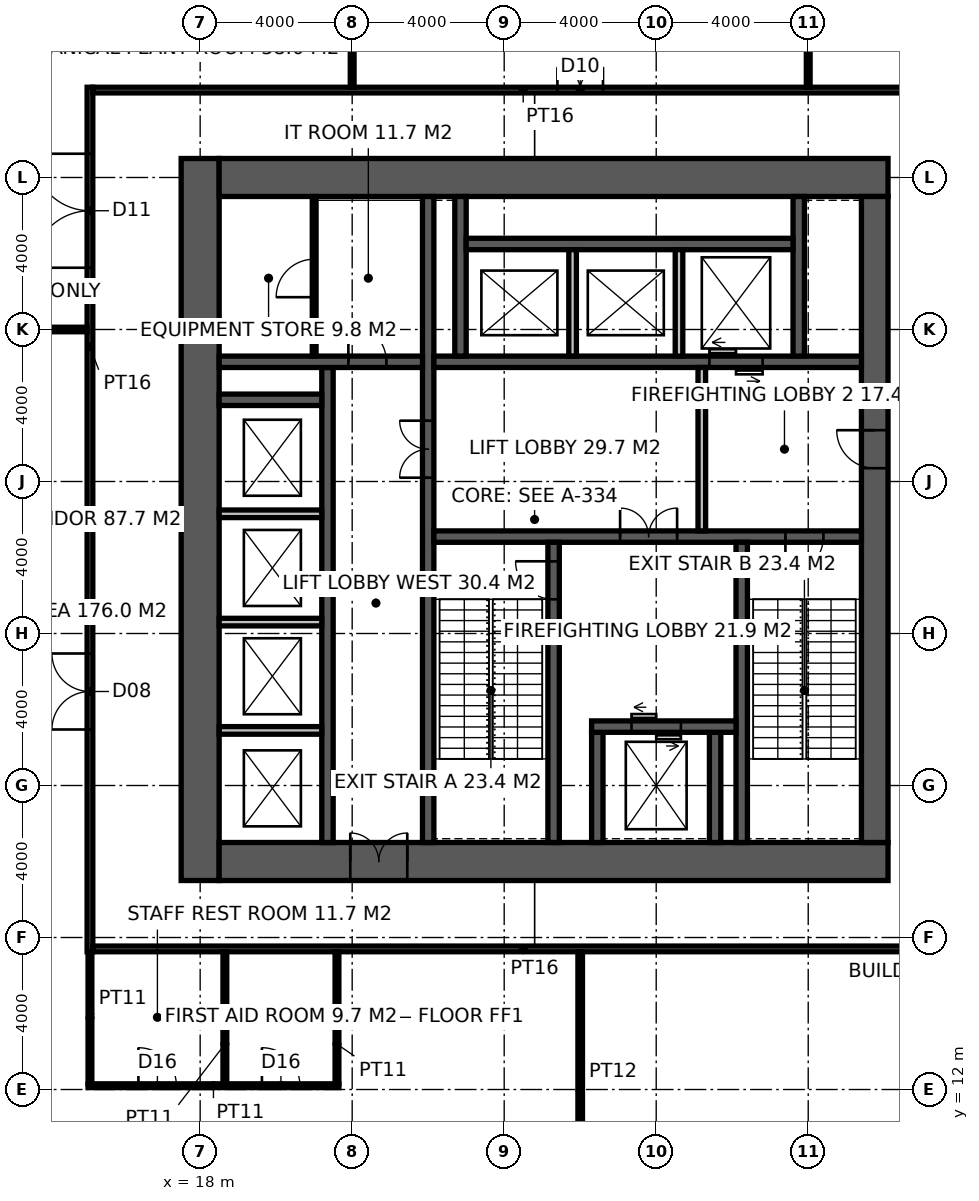
"""IFC4 building model, lengths in metres.
Left out: names, types, materials, properties, quantities, classifications, styles, units other than length and angle.
Written with IfcOpenShell. Run it as: python <this file> out.ifc"""

import sys

from ifc_helpers import new_model, si_unit, direction, frame, frame_2d, origin, place, context, subcontext, project, spatial, rectangle, extrude, element, fill, save


model = new_model("IFC4")
c1 = context("Model", 3, precision=1e-05, world=origin(), true_north=direction((0.0, 1.0)))
c2 = subcontext(c1, "Body", "Model", "MODEL_VIEW")
j1 = project(units=[si_unit("LENGTHUNIT", "METRE"), si_unit("PLANEANGLEUNIT", "RADIAN")], contexts=[c1])
p1 = place(None, origin())
s1 = spatial("IfcSite", under=j1, at=p1, CompositionType="ELEMENT")
p2 = place(p1, origin())
s2 = spatial("IfcBuilding", under=s1, at=p2, CompositionType="ELEMENT")
p3 = place(p2, frame((0.0, 0.0, 203.8)))
s3 = spatial("IfcBuildingStorey", under=s2, at=p3, CompositionType="ELEMENT", Elevation=203.8)
p4 = place(p3, frame((18.0, 17.5, -0.15), z_axis=(0.0, 0.0, 1.0), x_axis=(0.0, 1.0, 0.0)))
e1 = element("IfcWall", 1, at=p4, inside=s3, PredefinedType="SHEAR", context=c2, shape_type="SweptSolid", body=[
    extrude(rectangle(XDim=19.0, YDim=1.0, at=frame_2d((9.5, 0.0))), origin(), (0.0, 0.0, 1.0), 5.4),
])
p5 = place(p3, frame((18.5, 18.0, -0.15), z_axis=(0.0, 0.0, 1.0), x_axis=(1.0, 0.0, 0.0)))
e2 = element("IfcWall", 2, at=p5, inside=s3, PredefinedType="SHEAR", context=c2, shape_type="SweptSolid", body=[
    extrude(rectangle(XDim=17.6, YDim=1.0, at=frame_2d((8.8, 0.0))), origin(), (0.0, 0.0, 1.0), 5.4),
])
p6 = place(p5, frame((3.45, 0.0, 0.15)))
e3 = element("IfcOpeningElement", 3, at=p6, cuts=e2, PredefinedType="OPENING", context=c2, shape_type="SweptSolid", body=[
    extrude(rectangle(XDim=1.5, YDim=2.4, at=frame_2d((0.75, 1.2))), frame((0.0, 0.51, 0.0), z_axis=(0.0, -1.0, 0.0), x_axis=(1.0, 0.0, 0.0)), (0.0, 0.0, 1.0), 1.02),
])
p7 = place(p3, frame((18.5, 36.0, -0.15), z_axis=(0.0, 0.0, 1.0), x_axis=(1.0, 0.0, 0.0)))
e4 = element("IfcWall", 4, at=p7, inside=s3, PredefinedType="SHEAR", context=c2, shape_type="SweptSolid", body=[
    extrude(rectangle(XDim=17.6, YDim=1.0, at=frame_2d((8.8, 0.0))), origin(), (0.0, 0.0, 1.0), 5.4),
])
p8 = place(p3, frame((35.75, 18.5, -0.15), z_axis=(0.0, 0.0, 1.0), x_axis=(0.0, 1.0, 0.0)))
e5 = element("IfcWall", 5, at=p8, inside=s3, PredefinedType="SHEAR", context=c2, shape_type="SweptSolid", body=[
    extrude(rectangle(XDim=17.0, YDim=0.7, at=frame_2d((8.5, 0.0))), origin(), (0.0, 0.0, 1.0), 5.4),
])
p9 = place(p8, frame((9.85, 0.0, 0.15)))
e6 = element("IfcOpeningElement", 6, at=p9, cuts=e5, PredefinedType="OPENING", context=c2, shape_type="SweptSolid", body=[
    extrude(rectangle(XDim=1.0, YDim=2.2, at=frame_2d((0.5, 1.1))), frame((0.0, 0.36, 0.0), z_axis=(0.0, -1.0, 0.0), x_axis=(1.0, 0.0, 0.0)), (0.0, 0.0, 1.0), 0.72),
])
p10 = place(p3, frame((24.0, 18.5, -0.15), z_axis=(0.0, 0.0, 1.0), x_axis=(0.0, 1.0, 0.0)))
e7 = element("IfcWall", 7, at=p10, inside=s3, PredefinedType="SHEAR", context=c2, shape_type="SweptSolid", body=[
    extrude(rectangle(XDim=17.0, YDim=0.3, at=frame_2d((8.5, 0.0))), origin(), (0.0, 0.0, 1.0), 5.4),
])
p11 = place(p10, frame((9.6, 0.0, 0.15)))
e8 = element("IfcOpeningElement", 8, at=p11, cuts=e7, PredefinedType="OPENING", context=c2, shape_type="SweptSolid", body=[
    extrude(rectangle(XDim=1.5, YDim=2.4, at=frame_2d((0.75, 1.2))), frame((0.0, 0.16, 0.0), z_axis=(0.0, -1.0, 0.0), x_axis=(1.0, 0.0, 0.0)), (0.0, 0.0, 1.0), 0.32),
])
p12 = place(p3, frame((24.15, 26.55, -0.15), z_axis=(0.0, 0.0, 1.0), x_axis=(1.0, 0.0, 0.0)))
e9 = element("IfcWall", 9, at=p12, inside=s3, PredefinedType="SHEAR", context=c2, shape_type="SweptSolid", body=[
    extrude(rectangle(XDim=11.25, YDim=0.3, at=frame_2d((5.625, 0.0))), origin(), (0.0, 0.0, 1.0), 5.4),
])
p13 = place(p12, frame((9.25, 0.0, 0.15)))
e10 = element("IfcOpeningElement", 10, at=p13, cuts=e9, PredefinedType="OPENING", context=c2, shape_type="SweptSolid", body=[
    extrude(rectangle(XDim=1.0, YDim=2.2, at=frame_2d((0.5, 1.1))), frame((0.0, 0.16, 0.0), z_axis=(0.0, -1.0, 0.0), x_axis=(1.0, 0.0, 0.0)), (0.0, 0.0, 1.0), 0.32),
])
p14 = place(p12, frame((4.9, 0.0, 0.15)))
e11 = element("IfcOpeningElement", 11, at=p14, cuts=e9, PredefinedType="OPENING", context=c2, shape_type="SweptSolid", body=[
    extrude(rectangle(XDim=1.5, YDim=2.4, at=frame_2d((0.75, 1.2))), frame((0.0, 0.16, 0.0), z_axis=(0.0, -1.0, 0.0), x_axis=(1.0, 0.0, 0.0)), (0.0, 0.0, 1.0), 0.32),
])
p15 = place(p3, frame((27.3, 18.5, -0.15), z_axis=(0.0, 0.0, 1.0), x_axis=(0.0, 1.0, 0.0)))
e12 = element("IfcWall", 12, at=p15, inside=s3, PredefinedType="SHEAR", context=c2, shape_type="SweptSolid", body=[
    extrude(rectangle(XDim=7.9, YDim=0.3, at=frame_2d((3.95, 0.0))), origin(), (0.0, 0.0, 1.0), 5.4),
])
p16 = place(p15, frame((6.4, 0.0, 0.15)))
e13 = element("IfcOpeningElement", 13, at=p16, cuts=e12, PredefinedType="OPENING", context=c2, shape_type="SweptSolid", body=[
    extrude(rectangle(XDim=1.0, YDim=2.2, at=frame_2d((0.5, 1.1))), frame((0.0, 0.16, 0.0), z_axis=(0.0, -1.0, 0.0), x_axis=(1.0, 0.0, 0.0)), (0.0, 0.0, 1.0), 0.32),
])
p17 = place(p3, frame((32.25, 18.5, -0.15), z_axis=(0.0, 0.0, 1.0), x_axis=(0.0, 1.0, 0.0)))
e14 = element("IfcWall", 14, at=p17, inside=s3, PredefinedType="SHEAR", context=c2, shape_type="SweptSolid", body=[
    extrude(rectangle(XDim=7.9, YDim=0.3, at=frame_2d((3.95, 0.0))), origin(), (0.0, 0.0, 1.0), 5.4),
])
for number, where, z_axis, x_axis in (
    (15, (28.45, 18.5, -0.15), (0.0, 0.0, 1.0), (0.0, 1.0, 0.0)),
    (16, (31.55, 18.5, -0.15), (0.0, 0.0, 1.0), (0.0, 1.0, 0.0)),
):
    element("IfcWall", number, at=place(p3, frame(where, z_axis=z_axis, x_axis=x_axis)), inside=s3, PredefinedType="SHEAR", context=c2, shape_type="SweptSolid", body=[
        extrude(rectangle(XDim=2.9, YDim=0.3, at=frame_2d((1.45, 0.0))), origin(), (0.0, 0.0, 1.0), 5.4),
    ])
p18 = place(p3, frame((28.3, 21.55, -0.15), z_axis=(0.0, 0.0, 1.0), x_axis=(1.0, 0.0, 0.0)))
e17 = element("IfcWall", 17, at=p18, inside=s3, PredefinedType="SHEAR", context=c2, shape_type="SweptSolid", body=[
    extrude(rectangle(XDim=3.8, YDim=0.3, at=frame_2d((1.9, 0.0))), origin(), (0.0, 0.0, 1.0), 5.4),
])
p19 = place(p18, frame((1.05, 0.0, 0.15)))
e18 = element("IfcOpeningElement", 18, at=p19, cuts=e17, PredefinedType="OPENING", context=c2, shape_type="SweptSolid", body=[
    extrude(rectangle(XDim=1.3, YDim=2.4, at=frame_2d((0.65, 1.2))), frame((0.0, 0.16, 0.0), z_axis=(0.0, -1.0, 0.0), x_axis=(1.0, 0.0, 0.0)), (0.0, 0.0, 1.0), 0.32),
])
p20 = place(p3, frame((24.15, 31.15, -0.15), z_axis=(0.0, 0.0, 1.0), x_axis=(1.0, 0.0, 0.0)))
e19 = element("IfcWall", 19, at=p20, inside=s3, PredefinedType="SHEAR", context=c2, shape_type="SweptSolid", body=[
    extrude(rectangle(XDim=11.25, YDim=0.3, at=frame_2d((5.625, 0.0))), origin(), (0.0, 0.0, 1.0), 5.4),
])
p21 = place(p20, frame((7.25, 0.0, 0.15)))
e20 = element("IfcOpeningElement", 20, at=p21, cuts=e19, PredefinedType="OPENING", context=c2, shape_type="SweptSolid", body=[
    extrude(rectangle(XDim=1.4, YDim=2.4, at=frame_2d((0.7, 1.2))), frame((0.0, 0.16, 0.0), z_axis=(0.0, -1.0, 0.0), x_axis=(1.0, 0.0, 0.0)), (0.0, 0.0, 1.0), 0.32),
])
p22 = place(p3, frame((21.35, 18.5, -0.15), z_axis=(0.0, 0.0, 1.0), x_axis=(0.0, 1.0, 0.0)))
e21 = element("IfcWall", 21, at=p22, inside=s3, PredefinedType="SHEAR", context=c2, shape_type="SweptSolid", body=[
    extrude(rectangle(XDim=12.5, YDim=0.3, at=frame_2d((6.25, 0.0))), origin(), (0.0, 0.0, 1.0), 5.4),
])
p23 = place(p3, frame((18.5, 31.15, -0.15), z_axis=(0.0, 0.0, 1.0), x_axis=(1.0, 0.0, 0.0)))
e22 = element("IfcWall", 22, at=p23, inside=s3, PredefinedType="SHEAR", context=c2, shape_type="SweptSolid", body=[
    extrude(rectangle(XDim=5.35, YDim=0.3, at=frame_2d((2.675, 0.0))), origin(), (0.0, 0.0, 1.0), 5.4),
])
p24 = place(p23, frame((3.4, 0.0, 0.15)))
e23 = element("IfcOpeningElement", 23, at=p24, cuts=e22, PredefinedType="OPENING", context=c2, shape_type="SweptSolid", body=[
    extrude(rectangle(XDim=1.0, YDim=2.2, at=frame_2d((0.5, 1.1))), frame((0.0, 0.16, 0.0), z_axis=(0.0, -1.0, 0.0), x_axis=(1.0, 0.0, 0.0)), (0.0, 0.0, 1.0), 0.32),
])
p25 = place(p3, frame((18.5, 30.15, -0.15), z_axis=(0.0, 0.0, 1.0), x_axis=(1.0, 0.0, 0.0)))
e24 = element("IfcWall", 24, at=p25, inside=s3, PredefinedType="SHEAR", context=c2, shape_type="SweptSolid", body=[
    extrude(rectangle(XDim=2.7, YDim=0.3, at=frame_2d((1.35, 0.0))), origin(), (0.0, 0.0, 1.0), 5.4),
])
for number, where, z_axis, x_axis in (
    (25, (24.85, 31.3, -0.15), (0.0, 0.0, 1.0), (0.0, 1.0, 0.0)),
    (26, (33.75, 31.3, -0.15), (0.0, 0.0, 1.0), (0.0, 1.0, 0.0)),
):
    element("IfcWall", number, at=place(p3, frame(where, z_axis=z_axis, x_axis=x_axis)), inside=s3, PredefinedType="SHEAR", context=c2, shape_type="SweptSolid", body=[
        extrude(rectangle(XDim=4.2, YDim=0.3, at=frame_2d((2.1, 0.0))), origin(), (0.0, 0.0, 1.0), 5.4),
    ])
p26 = place(p3, frame((25.0, 34.25, -0.15), z_axis=(0.0, 0.0, 1.0), x_axis=(1.0, 0.0, 0.0)))
e27 = element("IfcWall", 27, at=p26, inside=s3, PredefinedType="SHEAR", context=c2, shape_type="SweptSolid", body=[
    extrude(rectangle(XDim=8.6, YDim=0.3, at=frame_2d((4.3, 0.0))), origin(), (0.0, 0.0, 1.0), 5.4),
])
for number, where, z_axis, x_axis in (
    (28, (27.8, 31.3, -0.15), (0.0, 0.0, 1.0), (0.0, 1.0, 0.0)),
    (29, (30.6, 31.3, -0.15), (0.0, 0.0, 1.0), (0.0, 1.0, 0.0)),
):
    element("IfcWall", number, at=place(p3, frame(where, z_axis=z_axis, x_axis=x_axis)), inside=s3, PredefinedType="SOLIDWALL", context=c2, shape_type="SweptSolid", body=[
        extrude(rectangle(XDim=2.8, YDim=0.2, at=frame_2d((1.4, 0.0))), origin(), (0.0, 0.0, 1.0), 5.4),
    ])
for number, where, z_axis, x_axis in (
    (30, (18.5, 21.45, 0.0), (0.0, 0.0, 1.0), (1.0, 0.0, 0.0)),
    (31, (18.5, 24.3, 0.0), (0.0, 0.0, 1.0), (1.0, 0.0, 0.0)),
    (32, (18.5, 27.15, 0.0), (0.0, 0.0, 1.0), (1.0, 0.0, 0.0)),
):
    element("IfcWall", number, at=place(p3, frame(where, z_axis=z_axis, x_axis=x_axis)), inside=s3, PredefinedType="SOLIDWALL", context=c2, shape_type="SweptSolid", body=[
        extrude(rectangle(XDim=2.7, YDim=0.2, at=frame_2d((1.35, 0.0))), origin(), (0.0, 0.0, 1.0), 5.25),
    ])
p27 = place(p3, frame((31.2, 26.7, 0.0), z_axis=(0.0, 0.0, 1.0), x_axis=(0.0, 1.0, 0.0)))
e33 = element("IfcWall", 33, at=p27, inside=s3, PredefinedType="SOLIDWALL", context=c2, shape_type="SweptSolid", body=[
    extrude(rectangle(XDim=4.3, YDim=0.2, at=frame_2d((2.15, 0.0))), origin(), (0.0, 0.0, 1.0), 5.25),
])
p28 = place(p3, frame((21.0, 31.3, 0.0), z_axis=(0.0, 0.0, 1.0), x_axis=(0.0, 1.0, 0.0)))
e34 = element("IfcWall", 34, at=p28, inside=s3, PredefinedType="PARTITIONING", context=c2, shape_type="SweptSolid", body=[
    extrude(rectangle(XDim=4.2, YDim=0.1, at=frame_2d((2.1, 0.0))), origin(), (0.0, 0.0, 1.0), 5.25),
])
p29 = place(p28, frame((1.55, 0.0, 0.0)))
e35 = element("IfcOpeningElement", 35, at=p29, cuts=e34, PredefinedType="OPENING", context=c2, shape_type="SweptSolid", body=[
    extrude(rectangle(XDim=1.0, YDim=2.2, at=frame_2d((0.5, 1.1))), frame((0.0, 0.06, 0.0), z_axis=(0.0, -1.0, 0.0), x_axis=(1.0, 0.0, 0.0)), (0.0, 0.0, 1.0), 0.12),
])
p30 = place(p3, frame((15.1, 15.625, 0.0), z_axis=(0.0, 0.0, 1.0), x_axis=(0.0, 1.0, 0.0)))
e36 = element("IfcWall", 36, at=p30, inside=s3, PredefinedType="PARTITIONING", context=c2, shape_type="SweptSolid", body=[
    extrude(rectangle(XDim=22.75, YDim=0.15, at=frame_2d((11.375, 0.0))), origin(), (0.0, 0.0, 1.0), 5.25),
])
p31 = place(p30, frame((5.849, 0.0, 0.0)))
e37 = element("IfcOpeningElement", 37, at=p31, cuts=e36, PredefinedType="OPENING", context=c2, shape_type="SweptSolid", body=[
    extrude(rectangle(XDim=2.0, YDim=2.4, at=frame_2d((1.0, 1.2))), frame((0.0, 0.085, 0.0), z_axis=(0.0, -1.0, 0.0), x_axis=(1.0, 0.0, 0.0)), (0.0, 0.0, 1.0), 0.17),
])
p32 = place(p30, frame((18.0, 0.0, 0.0)))
e38 = element("IfcOpeningElement", 38, at=p32, cuts=e36, PredefinedType="OPENING", context=c2, shape_type="SweptSolid", body=[
    extrude(rectangle(XDim=3.0, YDim=3.3, at=frame_2d((1.5, 1.65))), frame((0.0, 0.085, 0.0), z_axis=(0.0, -1.0, 0.0), x_axis=(1.0, 0.0, 0.0)), (0.0, 0.0, 1.0), 0.17),
])
p33 = place(p3, frame((15.175, 15.7, 0.0), z_axis=(0.0, 0.0, 1.0), x_axis=(1.0, 0.0, 0.0)))
e39 = element("IfcWall", 39, at=p33, inside=s3, PredefinedType="PARTITIONING", context=c2, shape_type="SweptSolid", body=[
    extrude(rectangle(XDim=22.65, YDim=0.15, at=frame_2d((11.325, 0.0))), origin(), (0.0, 0.0, 1.0), 5.25),
])
p34 = place(p3, frame((15.175, 38.3, 0.0), z_axis=(0.0, 0.0, 1.0), x_axis=(1.0, 0.0, 0.0)))
e40 = element("IfcWall", 40, at=p34, inside=s3, PredefinedType="PARTITIONING", context=c2, shape_type="SweptSolid", body=[
    extrude(rectangle(XDim=22.65, YDim=0.15, at=frame_2d((11.325, 0.0))), origin(), (0.0, 0.0, 1.0), 5.25),
])
p35 = place(p34, frame((12.225, 0.0, 0.0)))
e41 = element("IfcOpeningElement", 41, at=p35, cuts=e40, PredefinedType="OPENING", context=c2, shape_type="SweptSolid", body=[
    extrude(rectangle(XDim=1.2, YDim=2.2, at=frame_2d((0.6, 1.1))), frame((0.0, 0.085, 0.0), z_axis=(0.0, -1.0, 0.0), x_axis=(1.0, 0.0, 0.0)), (0.0, 0.0, 1.0), 0.17),
])
for number, where, z_axis, x_axis in (
    (42, (22.0, 38.375, 0.0), (0.0, 0.0, 1.0), (0.0, 1.0, 0.0)),
    (43, (34.0, 38.375, 0.0), (0.0, 0.0, 1.0), (0.0, 1.0, 0.0)),
):
    element("IfcWall", number, at=place(p3, frame(where, z_axis=z_axis, x_axis=x_axis)), inside=s3, PredefinedType="PARTITIONING", context=c2, shape_type="SweptSolid", body=[
        extrude(rectangle(XDim=3.675, YDim=0.1, at=frame_2d((1.837, 0.0))), origin(), (0.0, 0.0, 1.0), 4.25),
    ])
p36 = place(p3, frame((28.0, 8.3, 0.0), z_axis=(0.0, 0.0, 1.0), x_axis=(0.0, 1.0, 0.0)))
e44 = element("IfcWall", 44, at=p36, inside=s3, PredefinedType="PARTITIONING", context=c2, shape_type="SweptSolid", body=[
    extrude(rectangle(XDim=7.325, YDim=0.12, at=frame_2d((3.663, 0.0))), origin(), (0.0, 0.0, 1.0), 5.25),
])
p37 = place(p3, frame((10.68, 32.0, 0.0), z_axis=(0.0, 0.0, 1.0), x_axis=(1.0, 0.0, 0.0)))
e45 = element("IfcWall", 45, at=p37, inside=s3, PredefinedType="PARTITIONING", context=c2, shape_type="SweptSolid", body=[
    extrude(rectangle(XDim=4.345, YDim=0.12, at=frame_2d((2.172, 0.0))), origin(), (0.0, 0.0, 1.0), 4.05),
])
p38 = place(p3, frame((15.05, 12.1, 0.0), z_axis=(0.0, 0.0, 1.0), x_axis=(1.0, 0.0, 0.0)))
e46 = element("IfcWall", 46, at=p38, inside=s3, PredefinedType="PARTITIONING", context=c2, shape_type="SweptSolid", body=[
    extrude(rectangle(XDim=6.6, YDim=0.1, at=frame_2d((3.3, 0.0))), origin(), (0.0, 0.0, 1.0), 5.25),
])
p39 = place(p38, frame((1.325, 0.0, 0.0)))
e47 = element("IfcOpeningElement", 47, at=p39, cuts=e46, PredefinedType="OPENING", context=c2, shape_type="SweptSolid", body=[
    extrude(rectangle(XDim=1.0, YDim=2.2, at=frame_2d((0.5, 1.1))), frame((0.0, 0.06, 0.0), z_axis=(0.0, -1.0, 0.0), x_axis=(1.0, 0.0, 0.0)), (0.0, 0.0, 1.0), 0.12),
])
p40 = place(p38, frame((4.575, 0.0, 0.0)))
e48 = element("IfcOpeningElement", 48, at=p40, cuts=e46, PredefinedType="OPENING", context=c2, shape_type="SweptSolid", body=[
    extrude(rectangle(XDim=1.0, YDim=2.2, at=frame_2d((0.5, 1.1))), frame((0.0, 0.06, 0.0), z_axis=(0.0, -1.0, 0.0), x_axis=(1.0, 0.0, 0.0)), (0.0, 0.0, 1.0), 0.12),
])
for number, where, z_axis, x_axis in (
    (49, (15.1, 12.15, 0.0), (0.0, 0.0, 1.0), (0.0, 1.0, 0.0)),
    (50, (18.65, 12.15, 0.0), (0.0, 0.0, 1.0), (0.0, 1.0, 0.0)),
    (51, (21.6, 12.15, 0.0), (0.0, 0.0, 1.0), (0.0, 1.0, 0.0)),
):
    element("IfcWall", number, at=place(p3, frame(where, z_axis=z_axis, x_axis=x_axis)), inside=s3, PredefinedType="PARTITIONING", context=c2, shape_type="SweptSolid", body=[
        extrude(rectangle(XDim=3.475, YDim=0.1, at=frame_2d((1.738, 0.0))), origin(), (0.0, 0.0, 1.0), 5.25),
    ])
p41 = place(p16, origin())
e52 = element("IfcDoor", 52, at=p41, inside=s3, OperationType="SINGLE_SWING_RIGHT", PredefinedType="DOOR", context=c2, shape_type="SweptSolid", body=[
    extrude(rectangle(XDim=1.0, YDim=2.2, at=frame_2d((0.5, 1.1))), frame((0.0, 0.025, 0.0), z_axis=(0.0, -1.0, 0.0), x_axis=(1.0, 0.0, 0.0)), (0.0, 0.0, 1.0), 0.05),
])
fill(e13, e52)
p42 = place(p13, frame((1.0, 0.0, 0.0), z_axis=(0.0, 0.0, 1.0), x_axis=(-1.0, 0.0, 0.0)))
e53 = element("IfcDoor", 53, at=p42, inside=s3, OperationType="SINGLE_SWING_RIGHT", PredefinedType="DOOR", context=c2, shape_type="SweptSolid", body=[
    extrude(rectangle(XDim=1.0, YDim=2.2, at=frame_2d((0.5, 1.1))), frame((0.0, 0.025, 0.0), z_axis=(0.0, -1.0, 0.0), x_axis=(1.0, 0.0, 0.0)), (0.0, 0.0, 1.0), 0.05),
])
fill(e10, e53)
p43 = place(p9, origin())
e54 = element("IfcDoor", 54, at=p43, inside=s3, OperationType="SINGLE_SWING_RIGHT", PredefinedType="DOOR", context=c2, shape_type="SweptSolid", body=[
    extrude(rectangle(XDim=1.0, YDim=2.2, at=frame_2d((0.5, 1.1))), frame((0.0, 0.025, 0.0), z_axis=(0.0, -1.0, 0.0), x_axis=(1.0, 0.0, 0.0)), (0.0, 0.0, 1.0), 0.05),
])
fill(e6, e54)
p44 = place(p14, origin())
e55 = element("IfcDoor", 55, at=p44, inside=s3, OperationType="DOUBLE_DOOR_DOUBLE_SWING", PredefinedType="DOOR", context=c2, shape_type="SweptSolid", body=[
    extrude(rectangle(XDim=1.5, YDim=2.4, at=frame_2d((0.75, 1.2))), frame((0.0, 0.025, 0.0), z_axis=(0.0, -1.0, 0.0), x_axis=(1.0, 0.0, 0.0)), (0.0, 0.0, 1.0), 0.05),
])
fill(e11, e55)
p45 = place(p11, origin())
e56 = element("IfcDoor", 56, at=p45, inside=s3, OperationType="DOUBLE_DOOR_DOUBLE_SWING", PredefinedType="DOOR", context=c2, shape_type="SweptSolid", body=[
    extrude(rectangle(XDim=1.5, YDim=2.4, at=frame_2d((0.75, 1.2))), frame((0.0, 0.025, 0.0), z_axis=(0.0, -1.0, 0.0), x_axis=(1.0, 0.0, 0.0)), (0.0, 0.0, 1.0), 0.05),
])
fill(e8, e56)
p46 = place(p24, origin())
e57 = element("IfcDoor", 57, at=p46, inside=s3, OperationType="SINGLE_SWING_LEFT", PredefinedType="DOOR", context=c2, shape_type="SweptSolid", body=[
    extrude(rectangle(XDim=1.0, YDim=2.2, at=frame_2d((0.5, 1.1))), frame((0.0, 0.025, 0.0), z_axis=(0.0, -1.0, 0.0), x_axis=(1.0, 0.0, 0.0)), (0.0, 0.0, 1.0), 0.05),
])
fill(e23, e57)
p47 = place(p29, origin())
e58 = element("IfcDoor", 58, at=p47, inside=s3, OperationType="SINGLE_SWING_LEFT", PredefinedType="DOOR", context=c2, shape_type="SweptSolid", body=[
    extrude(rectangle(XDim=1.0, YDim=2.2, at=frame_2d((0.5, 1.1))), frame((0.0, 0.025, 0.0), z_axis=(0.0, -1.0, 0.0), x_axis=(1.0, 0.0, 0.0)), (0.0, 0.0, 1.0), 0.05),
])
fill(e35, e58)
p48 = place(p6, origin())
e59 = element("IfcDoor", 59, at=p48, inside=s3, OperationType="DOUBLE_DOOR_DOUBLE_SWING", PredefinedType="DOOR", context=c2, shape_type="SweptSolid", body=[
    extrude(rectangle(XDim=1.5, YDim=2.4, at=frame_2d((0.75, 1.2))), frame((0.0, 0.025, 0.0), z_axis=(0.0, -1.0, 0.0), x_axis=(1.0, 0.0, 0.0)), (0.0, 0.0, 1.0), 0.05),
])
fill(e3, e59)
p49 = place(p35, origin())
e60 = element("IfcDoor", 60, at=p49, inside=s3, OperationType="DOUBLE_DOOR_DOUBLE_SWING", PredefinedType="DOOR", context=c2, shape_type="SweptSolid", body=[
    extrude(rectangle(XDim=1.2, YDim=2.2, at=frame_2d((0.6, 1.1))), frame((0.0, 0.025, 0.0), z_axis=(0.0, -1.0, 0.0), x_axis=(1.0, 0.0, 0.0)), (0.0, 0.0, 1.0), 0.05),
])
fill(e41, e60)
p50 = place(p31, origin())
e61 = element("IfcDoor", 61, at=p50, inside=s3, OperationType="DOUBLE_DOOR_DOUBLE_SWING", PredefinedType="DOOR", context=c2, shape_type="SweptSolid", body=[
    extrude(rectangle(XDim=2.0, YDim=2.4, at=frame_2d((1.0, 1.2))), frame((0.0, 0.025, 0.0), z_axis=(0.0, -1.0, 0.0), x_axis=(1.0, 0.0, 0.0)), (0.0, 0.0, 1.0), 0.05),
])
fill(e37, e61)
p51 = place(p32, origin())
e62 = element("IfcDoor", 62, at=p51, inside=s3, OperationType="DOUBLE_DOOR_DOUBLE_SWING", PredefinedType="DOOR", context=c2, shape_type="SweptSolid", body=[
    extrude(rectangle(XDim=3.0, YDim=3.3, at=frame_2d((1.5, 1.65))), frame((0.0, 0.025, 0.0), z_axis=(0.0, -1.0, 0.0), x_axis=(1.0, 0.0, 0.0)), (0.0, 0.0, 1.0), 0.05),
])
fill(e38, e62)
p52 = place(p39, origin())
e63 = element("IfcDoor", 63, at=p52, inside=s3, OperationType="SINGLE_SWING_LEFT", PredefinedType="DOOR", context=c2, shape_type="SweptSolid", body=[
    extrude(rectangle(XDim=1.0, YDim=2.2, at=frame_2d((0.5, 1.1))), frame((0.0, 0.025, 0.0), z_axis=(0.0, -1.0, 0.0), x_axis=(1.0, 0.0, 0.0)), (0.0, 0.0, 1.0), 0.05),
])
fill(e47, e63)
p53 = place(p40, origin())
e64 = element("IfcDoor", 64, at=p53, inside=s3, OperationType="SINGLE_SWING_LEFT", PredefinedType="DOOR", context=c2, shape_type="SweptSolid", body=[
    extrude(rectangle(XDim=1.0, YDim=2.2, at=frame_2d((0.5, 1.1))), frame((0.0, 0.025, 0.0), z_axis=(0.0, -1.0, 0.0), x_axis=(1.0, 0.0, 0.0)), (0.0, 0.0, 1.0), 0.05),
])
fill(e48, e64)
p54 = place(p19, origin())
e65 = element("IfcDoor", 65, at=p54, inside=s3, OperationType="DOUBLE_DOOR_SLIDING", PredefinedType="DOOR", context=c2, shape_type="SweptSolid", body=[
    extrude(rectangle(XDim=1.3, YDim=2.4, at=frame_2d((0.65, 1.2))), frame((0.0, 0.025, 0.0), z_axis=(0.0, -1.0, 0.0), x_axis=(1.0, 0.0, 0.0)), (0.0, 0.0, 1.0), 0.05),
])
fill(e18, e65)
p55 = place(p21, origin())
e66 = element("IfcDoor", 66, at=p55, inside=s3, OperationType="DOUBLE_DOOR_SLIDING", PredefinedType="DOOR", context=c2, shape_type="SweptSolid", body=[
    extrude(rectangle(XDim=1.4, YDim=2.4, at=frame_2d((0.7, 1.2))), frame((0.0, 0.025, 0.0), z_axis=(0.0, -1.0, 0.0), x_axis=(1.0, 0.0, 0.0)), (0.0, 0.0, 1.0), 0.05),
])
fill(e20, e66)
save(model, sys.argv[1])
